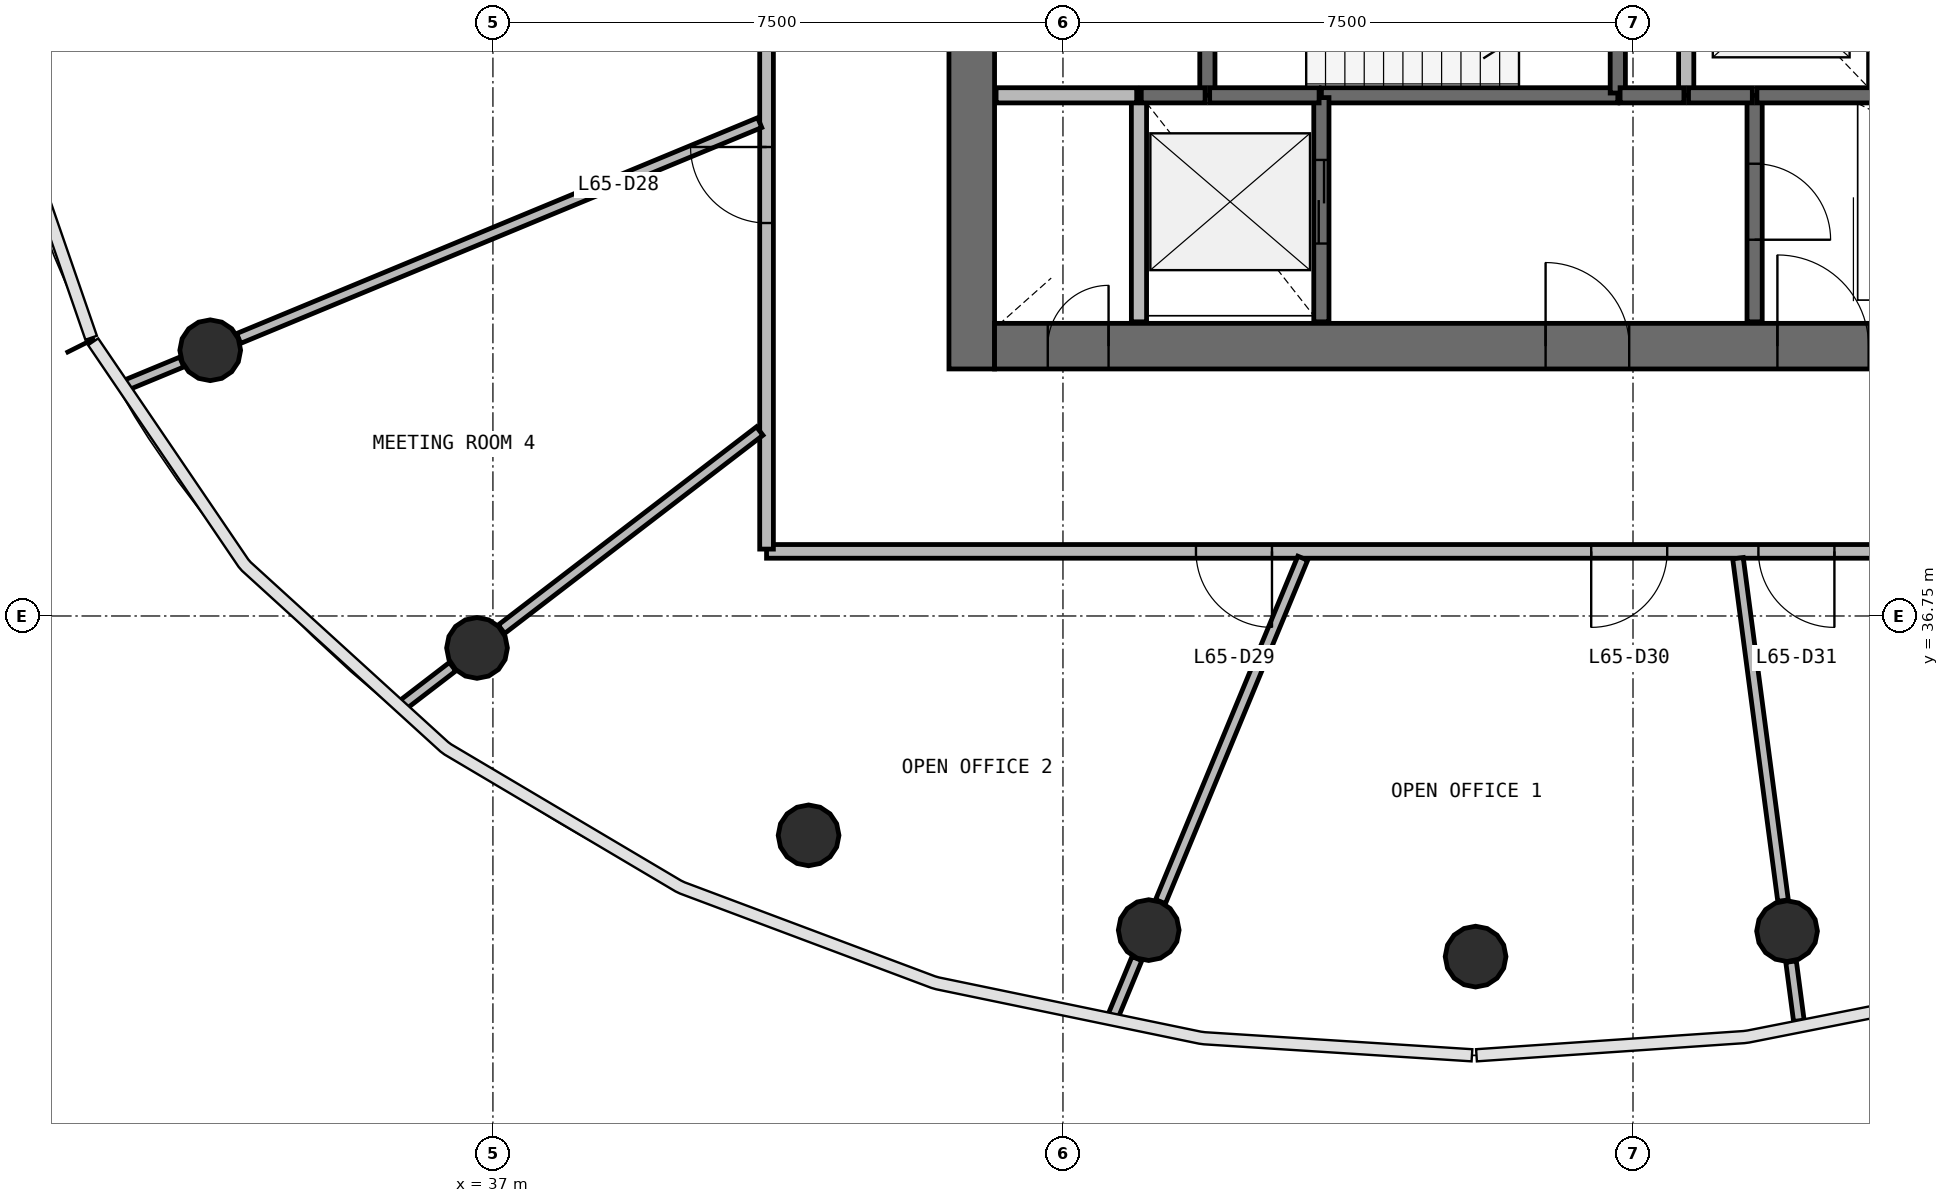
"""IFC4 building model, lengths in metres.
Left out: names, types, materials, properties, quantities, classifications, styles, units other than length and angle.
Written with IfcOpenShell. Run it as: python <this file> out.ifc"""

import sys

from ifc_helpers import new_model, si_unit, direction, frame, frame_2d, origin, origin_2d, place, context, subcontext, project, spatial, rectangle, circle, extrude, source, transform, mapped, element, fill, save


model = new_model("IFC4")
c1 = context("Model", 3, precision=1e-05, world=origin(), true_north=direction((0.0, 1.0)))
c2 = subcontext(c1, "Body", "Model", "MODEL_VIEW")
j1 = project(units=[si_unit("LENGTHUNIT", "METRE"), si_unit("PLANEANGLEUNIT", "RADIAN")], contexts=[c1])
p1 = place(None, origin())
s1 = spatial("IfcSite", under=j1, at=p1, CompositionType="ELEMENT")
p2 = place(p1, origin())
s2 = spatial("IfcBuilding", under=s1, at=p2, CompositionType="ELEMENT")
p3 = place(p2, frame((0.0, 0.0, 265.7)))
s3 = spatial("IfcBuildingStorey", under=s2, at=p3, CompositionType="ELEMENT", Elevation=265.7)
p4 = place(p3, frame((43.3, 56.0, 0.0), z_axis=(0.0, 0.0, 1.0), x_axis=(0.0, -1.0, 0.0)))
e1 = element("IfcWall", 1, at=p4, inside=s3, PredefinedType="SHEAR", context=c2, shape_type="SweptSolid", body=[
    extrude(rectangle(XDim=16.0, YDim=0.6, at=frame_2d((8.0, 0.0))), origin(), (0.0, 0.0, 1.0), 3.9),
])
p5 = place(p4, frame((7.1, 0.0, 0.0)))
e2 = element("IfcOpeningElement", 2, at=p5, cuts=e1, PredefinedType="OPENING", context=c2, shape_type="SweptSolid", body=[
    extrude(rectangle(XDim=1.8, YDim=2.1, at=frame_2d((0.9, 1.05))), frame((0.0, 0.31, 0.0), z_axis=(0.0, -1.0, 0.0), x_axis=(1.0, 0.0, 0.0)), (0.0, 0.0, 1.0), 0.62),
])
p6 = place(p3, frame((43.6, 40.3, 0.0), z_axis=(0.0, 0.0, 1.0), x_axis=(1.0, 0.0, 0.0)))
e3 = element("IfcWall", 3, at=p6, inside=s3, PredefinedType="SHEAR", context=c2, shape_type="SweptSolid", body=[
    extrude(rectangle(XDim=16.8, YDim=0.6, at=frame_2d((8.4, 0.0))), origin(), (0.0, 0.0, 1.0), 3.9),
])
p7 = place(p6, frame((10.3, 0.0, 0.0)))
e4 = element("IfcOpeningElement", 4, at=p7, cuts=e3, PredefinedType="OPENING", context=c2, shape_type="SweptSolid", body=[
    extrude(rectangle(XDim=1.2, YDim=2.1, at=frame_2d((0.6, 1.05))), frame((0.0, 0.31, 0.0), z_axis=(0.0, -1.0, 0.0), x_axis=(1.0, 0.0, 0.0)), (0.0, 0.0, 1.0), 0.62),
])
p8 = place(p6, frame((7.25, 0.0, 0.0)))
e5 = element("IfcOpeningElement", 5, at=p8, cuts=e3, PredefinedType="OPENING", context=c2, shape_type="SweptSolid", body=[
    extrude(rectangle(XDim=1.1, YDim=2.1, at=frame_2d((0.55, 1.05))), frame((0.0, 0.31, 0.0), z_axis=(0.0, -1.0, 0.0), x_axis=(1.0, 0.0, 0.0)), (0.0, 0.0, 1.0), 0.62),
])
p9 = place(p6, frame((0.7, 0.0, 0.0)))
e6 = element("IfcOpeningElement", 6, at=p9, cuts=e3, PredefinedType="OPENING", context=c2, shape_type="SweptSolid", body=[
    extrude(rectangle(XDim=0.8, YDim=2.1, at=frame_2d((0.4, 1.05))), frame((0.0, 0.31, 0.0), z_axis=(0.0, -1.0, 0.0), x_axis=(1.0, 0.0, 0.0)), (0.0, 0.0, 1.0), 0.62),
])
m1 = source(origin(), c2, "Body", "SweptSolid", [
    extrude(circle(Radius=0.4, at=origin_2d()), origin(), (0.0, 0.0, 1.0), 3.9),
])
for number, where, z_axis, x_axis in (
    (7, (33.281, 40.246, 0.0), (0.0, 0.0, 1.0), (1.0, 0.0, 0.0)),
    (8, (36.791, 36.329, 0.0), (0.0, 0.0, 1.0), (1.0, 0.0, 0.0)),
    (9, (41.153, 33.864, 0.0), (0.0, 0.0, 1.0), (1.0, 0.0, 0.0)),
    (10, (45.628, 32.617, 0.0), (0.0, 0.0, 1.0), (1.0, 0.0, 0.0)),
    (11, (49.929, 32.269, 0.0), (0.0, 0.0, 1.0), (1.0, 0.0, 0.0)),
    (12, (54.027, 32.604, 0.0), (0.0, 0.0, 1.0), (1.0, 0.0, 0.0)),
):
    element("IfcColumn", number, at=place(p3, frame(where, z_axis=z_axis, x_axis=x_axis)), inside=s3, PredefinedType="COLUMN", context=c2, shape_type="MappedRepresentation", body=[
        mapped(m1, transform((0.0, 0.0, 0.0), scale=1.0)),
    ])
p10 = place(p3, frame((51.8, 43.6, 0.0), z_axis=(0.0, 0.0, 1.0), x_axis=(-1.0, 0.0, 0.0)))
e13 = element("IfcWall", 13, at=p10, inside=s3, PredefinedType="SOLIDWALL", context=c2, shape_type="SweptSolid", body=[
    extrude(rectangle(XDim=3.9, YDim=0.2, at=frame_2d((1.95, 0.0))), origin(), (0.0, 0.0, 1.0), 3.62),
])
p11 = place(p3, frame((45.5, 43.6, 0.0), z_axis=(0.0, 0.0, 1.0), x_axis=(0.0, -1.0, 0.0)))
e14 = element("IfcWall", 14, at=p11, inside=s3, PredefinedType="SOLIDWALL", context=c2, shape_type="SweptSolid", body=[
    extrude(rectangle(XDim=2.98, YDim=0.2, at=frame_2d((1.49, 0.0))), origin(), (0.0, 0.0, 1.0), 2.7),
])
p12 = place(p3, frame((47.9, 40.62, 0.0), z_axis=(0.0, 0.0, 1.0), x_axis=(0.0, 1.0, 0.0)))
e15 = element("IfcWall", 15, at=p12, inside=s3, PredefinedType="SOLIDWALL", context=c2, shape_type="SweptSolid", body=[
    extrude(rectangle(XDim=2.95, YDim=0.2, at=frame_2d((1.475, 0.0))), origin(), (0.0, 0.0, 1.0), 2.7),
])
p13 = place(p12, frame((1.03, 0.0, 0.0)))
e16 = element("IfcOpeningElement", 16, at=p13, cuts=e15, PredefinedType="OPENING", context=c2, shape_type="SweptSolid", body=[
    extrude(rectangle(XDim=1.1, YDim=2.1, at=frame_2d((0.55, 1.05))), frame((0.0, 0.11, 0.0), z_axis=(0.0, -1.0, 0.0), x_axis=(1.0, 0.0, 0.0)), (0.0, 0.0, 1.0), 0.22),
])
p14 = place(p3, frame((53.6, 43.6, 0.0), z_axis=(0.0, 0.0, 1.0), x_axis=(0.0, -1.0, 0.0)))
e17 = element("IfcWall", 17, at=p14, inside=s3, PredefinedType="SOLIDWALL", context=c2, shape_type="SweptSolid", body=[
    extrude(rectangle(XDim=2.98, YDim=0.2, at=frame_2d((1.49, 0.0))), origin(), (0.0, 0.0, 1.0), 2.7),
])
p15 = place(p14, frame((0.9, 0.0, 0.0)))
e18 = element("IfcOpeningElement", 18, at=p15, cuts=e17, PredefinedType="OPENING", context=c2, shape_type="SweptSolid", body=[
    extrude(rectangle(XDim=1.0, YDim=2.1, at=frame_2d((0.5, 1.05))), frame((0.0, 0.11, 0.0), z_axis=(0.0, -1.0, 0.0), x_axis=(1.0, 0.0, 0.0)), (0.0, 0.0, 1.0), 0.22),
])
p16 = place(p3, frame((46.4, 45.99, 0.0), z_axis=(0.0, 0.0, 1.0), x_axis=(0.0, -1.0, 0.0)))
e19 = element("IfcWall", 19, at=p16, inside=s3, PredefinedType="SOLIDWALL", context=c2, shape_type="SweptSolid", body=[
    extrude(rectangle(XDim=2.39, YDim=0.2, at=frame_2d((1.195, 0.0))), origin(), (0.0, 0.0, 1.0), 3.62),
])
p17 = place(p3, frame((51.8, 43.63, 0.0), z_axis=(0.0, 0.0, 1.0), x_axis=(0.0, 1.0, 0.0)))
e20 = element("IfcWall", 20, at=p17, inside=s3, PredefinedType="SOLIDWALL", context=c2, shape_type="SweptSolid", body=[
    extrude(rectangle(XDim=2.36, YDim=0.2, at=frame_2d((1.18, 0.0))), origin(), (0.0, 0.0, 1.0), 3.62),
])
p18 = place(p3, frame((52.7, 45.99, 0.0), z_axis=(0.0, 0.0, 1.0), x_axis=(0.0, -1.0, 0.0)))
e21 = element("IfcWall", 21, at=p18, inside=s3, PredefinedType="SOLIDWALL", context=c2, shape_type="SweptSolid", body=[
    extrude(rectangle(XDim=2.39, YDim=0.2, at=frame_2d((1.195, 0.0))), origin(), (0.0, 0.0, 1.0), 3.62),
])
p19 = place(p3, frame((55.2, 43.63, 0.0), z_axis=(0.0, 0.0, 1.0), x_axis=(0.0, 1.0, 0.0)))
e22 = element("IfcWall", 22, at=p19, inside=s3, PredefinedType="SOLIDWALL", context=c2, shape_type="SweptSolid", body=[
    extrude(rectangle(XDim=2.36, YDim=0.2, at=frame_2d((1.18, 0.0))), origin(), (0.0, 0.0, 1.0), 3.62),
])
p20 = place(p3, frame((45.47, 43.6, 0.0), z_axis=(0.0, 0.0, 1.0), x_axis=(-1.0, 0.0, 0.0)))
e23 = element("IfcWall", 23, at=p20, inside=s3, PredefinedType="SOLIDWALL", context=c2, shape_type="SweptSolid", body=[
    extrude(rectangle(XDim=1.85, YDim=0.2, at=frame_2d((0.925, 0.0))), origin(), (0.0, 0.0, 1.0), 2.7),
])
p21 = place(p3, frame((53.63, 43.6, 0.0), z_axis=(0.0, 0.0, 1.0), x_axis=(1.0, 0.0, 0.0)))
e24 = element("IfcWall", 24, at=p21, inside=s3, PredefinedType="SOLIDWALL", context=c2, shape_type="SweptSolid", body=[
    extrude(rectangle(XDim=1.54, YDim=0.2, at=frame_2d((0.77, 0.0))), origin(), (0.0, 0.0, 1.0), 3.62),
])
p22 = place(p3, frame((47.87, 43.6, 0.0), z_axis=(0.0, 0.0, 1.0), x_axis=(-1.0, 0.0, 0.0)))
e25 = element("IfcWall", 25, at=p22, inside=s3, PredefinedType="SOLIDWALL", context=c2, shape_type="SweptSolid", body=[
    extrude(rectangle(XDim=1.44, YDim=0.2, at=frame_2d((0.72, 0.0))), origin(), (0.0, 0.0, 1.0), 3.62),
])
p23 = place(p3, frame((52.67, 43.6, 0.0), z_axis=(0.0, 0.0, 1.0), x_axis=(-1.0, 0.0, 0.0)))
e26 = element("IfcWall", 26, at=p23, inside=s3, PredefinedType="SOLIDWALL", context=c2, shape_type="SweptSolid", body=[
    extrude(rectangle(XDim=0.84, YDim=0.2, at=frame_2d((0.42, 0.0))), origin(), (0.0, 0.0, 1.0), 3.62),
])
p24 = place(p3, frame((46.37, 43.6, 0.0), z_axis=(0.0, 0.0, 1.0), x_axis=(-1.0, 0.0, 0.0)))
e27 = element("IfcWall", 27, at=p24, inside=s3, PredefinedType="SOLIDWALL", context=c2, shape_type="SweptSolid", body=[
    extrude(rectangle(XDim=0.84, YDim=0.2, at=frame_2d((0.42, 0.0))), origin(), (0.0, 0.0, 1.0), 2.7),
])
p25 = place(p3, frame((52.73, 43.6, 0.0), z_axis=(0.0, 0.0, 1.0), x_axis=(1.0, 0.0, 0.0)))
e28 = element("IfcWall", 28, at=p25, inside=s3, PredefinedType="SOLIDWALL", context=c2, shape_type="SweptSolid", body=[
    extrude(rectangle(XDim=0.84, YDim=0.2, at=frame_2d((0.42, 0.0))), origin(), (0.0, 0.0, 1.0), 3.62),
])
p26 = place(p3, frame((63.4, 37.6, 0.0), z_axis=(0.0, 0.0, 1.0), x_axis=(-1.0, 0.0, 0.0)))
e29 = element("IfcWall", 29, at=p26, inside=s3, PredefinedType="PARTITIONING", context=c2, shape_type="SweptSolid", body=[
    extrude(rectangle(XDim=22.8, YDim=0.18, at=frame_2d((11.4, 0.0))), origin(), (0.0, 0.0, 1.0), 2.92),
])
p27 = place(p26, frame((16.15, 0.0, 0.0)))
e30 = element("IfcOpeningElement", 30, at=p27, cuts=e29, PredefinedType="OPENING", context=c2, shape_type="SweptSolid", body=[
    extrude(rectangle(XDim=1.0, YDim=2.1, at=frame_2d((0.5, 1.05))), frame((0.0, 0.1, 0.0), z_axis=(0.0, -1.0, 0.0), x_axis=(1.0, 0.0, 0.0)), (0.0, 0.0, 1.0), 0.2),
])
p28 = place(p26, frame((10.95, 0.0, 0.0)))
e31 = element("IfcOpeningElement", 31, at=p28, cuts=e29, PredefinedType="OPENING", context=c2, shape_type="SweptSolid", body=[
    extrude(rectangle(XDim=1.0, YDim=2.1, at=frame_2d((0.5, 1.05))), frame((0.0, 0.1, 0.0), z_axis=(0.0, -1.0, 0.0), x_axis=(1.0, 0.0, 0.0)), (0.0, 0.0, 1.0), 0.2),
])
p29 = place(p26, frame((8.75, 0.0, 0.0)))
e32 = element("IfcOpeningElement", 32, at=p29, cuts=e29, PredefinedType="OPENING", context=c2, shape_type="SweptSolid", body=[
    extrude(rectangle(XDim=1.0, YDim=2.1, at=frame_2d((0.5, 1.05))), frame((0.0, 0.1, 0.0), z_axis=(0.0, -1.0, 0.0), x_axis=(1.0, 0.0, 0.0)), (0.0, 0.0, 1.0), 0.2),
])
p30 = place(p3, frame((40.6, 37.63, 0.0), z_axis=(0.0, 0.0, 1.0), x_axis=(0.0, 1.0, 0.0)))
e33 = element("IfcWall", 33, at=p30, inside=s3, PredefinedType="PARTITIONING", context=c2, shape_type="SweptSolid", body=[
    extrude(rectangle(XDim=20.74, YDim=0.18, at=frame_2d((10.37, 0.0))), origin(), (0.0, 0.0, 1.0), 2.92),
])
p31 = place(p30, frame((9.89, 0.0, 0.0)))
e34 = element("IfcOpeningElement", 34, at=p31, cuts=e33, PredefinedType="OPENING", context=c2, shape_type="SweptSolid", body=[
    extrude(rectangle(XDim=1.0, YDim=2.1, at=frame_2d((0.5, 1.05))), frame((0.0, 0.1, 0.0), z_axis=(0.0, -1.0, 0.0), x_axis=(1.0, 0.0, 0.0)), (0.0, 0.0, 1.0), 0.2),
])
p32 = place(p30, frame((4.29, 0.0, 0.0)))
e35 = element("IfcOpeningElement", 35, at=p32, cuts=e33, PredefinedType="OPENING", context=c2, shape_type="SweptSolid", body=[
    extrude(rectangle(XDim=1.0, YDim=2.1, at=frame_2d((0.5, 1.05))), frame((0.0, 0.1, 0.0), z_axis=(0.0, -1.0, 0.0), x_axis=(1.0, 0.0, 0.0)), (0.0, 0.0, 1.0), 0.2),
])
p33 = place(p3, frame((40.51, 43.241, 0.0), z_axis=(0.0, 0.0, 1.0), x_axis=(-0.92388089155, -0.38268015134, 0.0)))
e36 = element("IfcWall", 36, at=p33, inside=s3, PredefinedType="PARTITIONING", context=c2, shape_type="SweptSolid", body=[
    extrude(rectangle(XDim=7.42, YDim=0.14, at=frame_2d((3.71, 0.0))), origin(), (0.0, 0.0, 1.0), 2.92),
])
p34 = place(p3, frame((47.655, 37.51, 0.0), z_axis=(0.0, 0.0, 1.0), x_axis=(-0.382689806821, -0.923876892099, 0.0)))
e37 = element("IfcWall", 37, at=p34, inside=s3, PredefinedType="PARTITIONING", context=c2, shape_type="SweptSolid", body=[
    extrude(rectangle(XDim=4.891, YDim=0.14, at=frame_2d((2.445, 0.0))), origin(), (0.0, 0.0, 1.0), 2.92),
])
p35 = place(p3, frame((53.381, 37.51, 0.0), z_axis=(0.0, 0.0, 1.0), x_axis=(0.130505936446, -0.991447527887, 0.0)))
e38 = element("IfcWall", 38, at=p35, inside=s3, PredefinedType="PARTITIONING", context=c2, shape_type="SweptSolid", body=[
    extrude(rectangle(XDim=4.544, YDim=0.14, at=frame_2d((2.272, 0.0))), origin(), (0.0, 0.0, 1.0), 2.92),
])
p36 = place(p3, frame((40.51, 39.183, 0.0), z_axis=(0.0, 0.0, 1.0), x_axis=(-0.793358616255, -0.608754553177, 0.0)))
e39 = element("IfcWall", 39, at=p36, inside=s3, PredefinedType="PARTITIONING", context=c2, shape_type="SweptSolid", body=[
    extrude(rectangle(XDim=4.284, YDim=0.14, at=frame_2d((2.142, 0.0))), origin(), (0.0, 0.0, 1.0), 2.92),
])
p37 = place(p3, frame((36.469, 36.083, 0.0), z_axis=(0.0, 0.0, 1.0), x_axis=(-0.793396032013, -0.608705788034, 0.0)))
e40 = element("IfcWall", 40, at=p37, inside=s3, PredefinedType="PARTITIONING", context=c2, shape_type="SweptSolid", body=[
    extrude(rectangle(XDim=0.822, YDim=0.14, at=frame_2d((0.411, 0.0))), origin(), (0.0, 0.0, 1.0), 2.92),
])
p38 = place(p3, frame((45.473, 32.243, 0.0), z_axis=(0.0, 0.0, 1.0), x_axis=(-0.382846417199, -0.923812005138, 0.0)))
e41 = element("IfcWall", 41, at=p38, inside=s3, PredefinedType="PARTITIONING", context=c2, shape_type="SweptSolid", body=[
    extrude(rectangle(XDim=0.814, YDim=0.14, at=frame_2d((0.407, 0.0))), origin(), (0.0, 0.0, 1.0), 2.92),
])
p39 = place(p3, frame((32.906, 40.091, 0.0), z_axis=(0.0, 0.0, 1.0), x_axis=(-0.923945811289, -0.382523382031, 0.0)))
e42 = element("IfcWall", 42, at=p39, inside=s3, PredefinedType="PARTITIONING", context=c2, shape_type="SweptSolid", body=[
    extrude(rectangle(XDim=0.796, YDim=0.14, at=frame_2d((0.398, 0.0))), origin(), (0.0, 0.0, 1.0), 2.92),
])
p40 = place(p3, frame((54.08, 32.203, 0.0), z_axis=(0.0, 0.0, 1.0), x_axis=(0.130575144093, -0.991438415508, 0.0)))
e43 = element("IfcWall", 43, at=p40, inside=s3, PredefinedType="PARTITIONING", context=c2, shape_type="SweptSolid", body=[
    extrude(rectangle(XDim=0.785, YDim=0.14, at=frame_2d((0.393, 0.0))), origin(), (0.0, 0.0, 1.0), 2.92),
])
m2 = source(origin(), c2, "Body", "SweptSolid", [
    extrude(rectangle(XDim=1.1, YDim=2.1, at=frame_2d((0.55, 1.05))), frame((0.0, 0.025, 0.0), z_axis=(0.0, -1.0, 0.0), x_axis=(1.0, 0.0, 0.0)), (0.0, 0.0, 1.0), 0.05),
])
p41 = place(p13, origin())
e44 = element("IfcDoor", 44, at=p41, inside=s3, OperationType="DOUBLE_DOOR_SLIDING", PredefinedType="USERDEFINED", context=c2, shape_type="MappedRepresentation", body=[
    mapped(m2, transform((0.0, 0.0, 0.0), scale=1.0)),
])
fill(e16, e44)
m3 = source(origin(), c2, "Body", "SweptSolid", [
    extrude(rectangle(XDim=1.2, YDim=2.1, at=frame_2d((0.6, 1.05))), frame((0.0, 0.025, 0.0), z_axis=(0.0, -1.0, 0.0), x_axis=(1.0, 0.0, 0.0)), (0.0, 0.0, 1.0), 0.05),
])
p42 = place(p7, origin())
e45 = element("IfcDoor", 45, at=p42, inside=s3, OperationType="SINGLE_SWING_LEFT", PredefinedType="DOOR", context=c2, shape_type="MappedRepresentation", body=[
    mapped(m3, transform((0.0, 0.0, 0.0), scale=1.0)),
])
fill(e4, e45)
m4 = source(origin(), c2, "Body", "SweptSolid", [
    extrude(rectangle(XDim=1.0, YDim=2.1, at=frame_2d((0.5, 1.05))), frame((0.0, 0.025, 0.0), z_axis=(0.0, -1.0, 0.0), x_axis=(1.0, 0.0, 0.0)), (0.0, 0.0, 1.0), 0.05),
])
p43 = place(p15, origin())
e46 = element("IfcDoor", 46, at=p43, inside=s3, OperationType="SINGLE_SWING_RIGHT", PredefinedType="DOOR", context=c2, shape_type="MappedRepresentation", body=[
    mapped(m4, transform((0.0, 0.0, 0.0), scale=1.0)),
])
fill(e18, e46)
m5 = source(origin(), c2, "Body", "SweptSolid", [
    extrude(rectangle(XDim=1.1, YDim=2.1, at=frame_2d((0.55, 1.05))), frame((0.0, 0.025, 0.0), z_axis=(0.0, -1.0, 0.0), x_axis=(1.0, 0.0, 0.0)), (0.0, 0.0, 1.0), 0.05),
])
p44 = place(p8, origin())
e47 = element("IfcDoor", 47, at=p44, inside=s3, OperationType="SINGLE_SWING_LEFT", PredefinedType="DOOR", context=c2, shape_type="MappedRepresentation", body=[
    mapped(m5, transform((0.0, 0.0, 0.0), scale=1.0)),
])
fill(e5, e47)
m6 = source(origin(), c2, "Body", "SweptSolid", [
    extrude(rectangle(XDim=0.8, YDim=2.1, at=frame_2d((0.4, 1.05))), frame((0.0, 0.025, 0.0), z_axis=(0.0, -1.0, 0.0), x_axis=(1.0, 0.0, 0.0)), (0.0, 0.0, 1.0), 0.05),
])
p45 = place(p9, origin())
e48 = element("IfcDoor", 48, at=p45, inside=s3, OperationType="SINGLE_SWING_RIGHT", PredefinedType="DOOR", context=c2, shape_type="MappedRepresentation", body=[
    mapped(m6, transform((0.0, 0.0, 0.0), scale=1.0)),
])
fill(e6, e48)
m7 = source(origin(), c2, "Body", "SweptSolid", [
    extrude(rectangle(XDim=1.0, YDim=2.1, at=frame_2d((0.5, 1.05))), frame((0.0, 0.025, 0.0), z_axis=(0.0, -1.0, 0.0), x_axis=(1.0, 0.0, 0.0)), (0.0, 0.0, 1.0), 0.05),
])
p46 = place(p32, origin())
e49 = element("IfcDoor", 49, at=p46, inside=s3, OperationType="SINGLE_SWING_RIGHT", PredefinedType="DOOR", context=c2, shape_type="MappedRepresentation", body=[
    mapped(m7, transform((0.0, 0.0, 0.0), scale=1.0)),
])
fill(e35, e49)
p47 = place(p27, origin())
e50 = element("IfcDoor", 50, at=p47, inside=s3, OperationType="SINGLE_SWING_LEFT", PredefinedType="DOOR", context=c2, shape_type="MappedRepresentation", body=[
    mapped(m7, transform((0.0, 0.0, 0.0), scale=1.0)),
])
fill(e30, e50)
p48 = place(p28, origin())
e51 = element("IfcDoor", 51, at=p48, inside=s3, OperationType="SINGLE_SWING_RIGHT", PredefinedType="DOOR", context=c2, shape_type="MappedRepresentation", body=[
    mapped(m7, transform((0.0, 0.0, 0.0), scale=1.0)),
])
fill(e31, e51)
p49 = place(p29, origin())
e52 = element("IfcDoor", 52, at=p49, inside=s3, OperationType="SINGLE_SWING_LEFT", PredefinedType="DOOR", context=c2, shape_type="MappedRepresentation", body=[
    mapped(m7, transform((0.0, 0.0, 0.0), scale=1.0)),
])
fill(e32, e52)
save(model, sys.argv[1])
